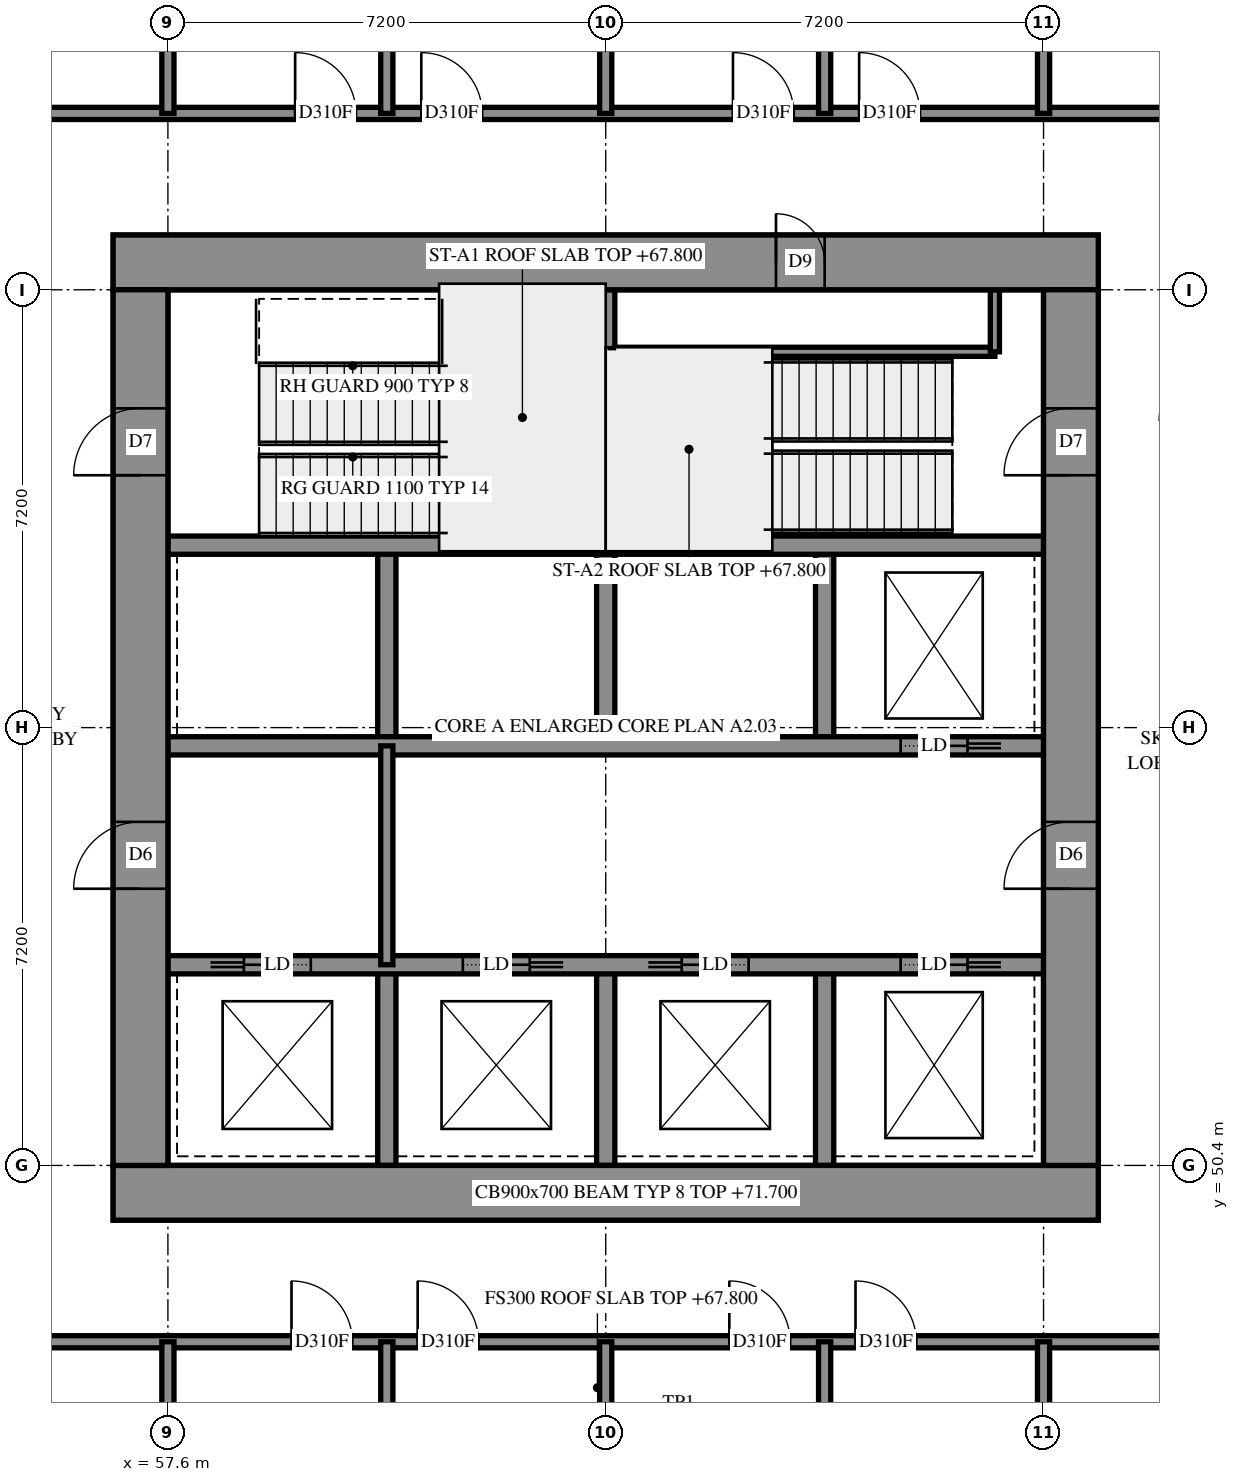
"""IFC4 building model, lengths in metres.
Left out: names, types, materials, properties, quantities, classifications, styles, units other than length and angle.
Written with IfcOpenShell. Run it as: python <this file> out.ifc"""

import sys

from ifc_helpers import new_model, si_unit, direction, frame, frame_2d, origin, place, context, subcontext, project, spatial, rectangle, extrude, element, fill, save


model = new_model("IFC4")
c1 = context("Model", 3, precision=1e-05, world=origin(), true_north=direction((0.0, 1.0)))
c2 = subcontext(c1, "Body", "Model", "MODEL_VIEW")
j1 = project(units=[si_unit("LENGTHUNIT", "METRE"), si_unit("PLANEANGLEUNIT", "RADIAN")], contexts=[c1])
p1 = place(None, origin())
s1 = spatial("IfcSite", under=j1, at=p1, CompositionType="ELEMENT")
p2 = place(p1, origin())
s2 = spatial("IfcBuilding", under=s1, at=p2, CompositionType="ELEMENT")
p3 = place(p2, frame((0.0, 0.0, 67.8)))
s3 = spatial("IfcBuildingStorey", under=s2, at=p3, CompositionType="ELEMENT", Elevation=67.8)
p4 = place(p3, frame((56.7, 49.95, -0.3), z_axis=(0.0, 0.0, 1.0), x_axis=(1.0, 0.0, 0.0)))
e1 = element("IfcWall", 1, at=p4, inside=s3, PredefinedType="SHEAR", context=c2, shape_type="SweptSolid", body=[
    extrude(rectangle(XDim=16.2, YDim=0.9, at=frame_2d((8.1, 0.0))), origin(), (0.0, 0.0, 1.0), 3.5),
])
p5 = place(p3, frame((56.7, 65.25, -0.3), z_axis=(0.0, 0.0, 1.0), x_axis=(1.0, 0.0, 0.0)))
e2 = element("IfcWall", 2, at=p5, inside=s3, PredefinedType="SHEAR", context=c2, shape_type="SweptSolid", body=[
    extrude(rectangle(XDim=16.2, YDim=0.9, at=frame_2d((8.1, 0.0))), origin(), (0.0, 0.0, 1.0), 3.5),
])
p6 = place(p5, frame((10.9, 0.0, 0.3)))
e3 = element("IfcOpeningElement", 3, at=p6, cuts=e2, PredefinedType="OPENING", context=c2, shape_type="SweptSolid", body=[
    extrude(rectangle(XDim=0.8, YDim=2.1, at=frame_2d((0.4, 1.05))), frame((0.0, 0.46, 0.0), z_axis=(0.0, -1.0, 0.0), x_axis=(1.0, 0.0, 0.0)), (0.0, 0.0, 1.0), 0.92),
])
p7 = place(p3, frame((57.15, 50.4, -0.3), z_axis=(0.0, 0.0, 1.0), x_axis=(0.0, 1.0, 0.0)))
e4 = element("IfcWall", 4, at=p7, inside=s3, PredefinedType="SHEAR", context=c2, shape_type="SweptSolid", body=[
    extrude(rectangle(XDim=14.4, YDim=0.9, at=frame_2d((7.2, 0.0))), origin(), (0.0, 0.0, 1.0), 3.5),
])
p8 = place(p7, frame((4.55, 0.0, 0.3)))
e5 = element("IfcOpeningElement", 5, at=p8, cuts=e4, PredefinedType="OPENING", context=c2, shape_type="SweptSolid", body=[
    extrude(rectangle(XDim=1.1, YDim=2.1, at=frame_2d((0.55, 1.05))), frame((0.0, 0.46, 0.0), z_axis=(0.0, -1.0, 0.0), x_axis=(1.0, 0.0, 0.0)), (0.0, 0.0, 1.0), 0.92),
])
p9 = place(p7, frame((11.35, 0.0, 0.3)))
e6 = element("IfcOpeningElement", 6, at=p9, cuts=e4, PredefinedType="OPENING", context=c2, shape_type="SweptSolid", body=[
    extrude(rectangle(XDim=1.1, YDim=2.1, at=frame_2d((0.55, 1.05))), frame((0.0, 0.46, 0.0), z_axis=(0.0, -1.0, 0.0), x_axis=(1.0, 0.0, 0.0)), (0.0, 0.0, 1.0), 0.92),
])
p10 = place(p3, frame((72.45, 50.4, -0.3), z_axis=(0.0, 0.0, 1.0), x_axis=(0.0, 1.0, 0.0)))
e7 = element("IfcWall", 7, at=p10, inside=s3, PredefinedType="SHEAR", context=c2, shape_type="SweptSolid", body=[
    extrude(rectangle(XDim=14.4, YDim=0.9, at=frame_2d((7.2, 0.0))), origin(), (0.0, 0.0, 1.0), 3.5),
])
p11 = place(p10, frame((4.55, 0.0, 0.3)))
e8 = element("IfcOpeningElement", 8, at=p11, cuts=e7, PredefinedType="OPENING", context=c2, shape_type="SweptSolid", body=[
    extrude(rectangle(XDim=1.1, YDim=2.1, at=frame_2d((0.55, 1.05))), frame((0.0, 0.46, 0.0), z_axis=(0.0, -1.0, 0.0), x_axis=(1.0, 0.0, 0.0)), (0.0, 0.0, 1.0), 0.92),
])
p12 = place(p10, frame((11.35, 0.0, 0.3)))
e9 = element("IfcOpeningElement", 9, at=p12, cuts=e7, PredefinedType="OPENING", context=c2, shape_type="SweptSolid", body=[
    extrude(rectangle(XDim=1.1, YDim=2.1, at=frame_2d((0.55, 1.05))), frame((0.0, 0.46, 0.0), z_axis=(0.0, -1.0, 0.0), x_axis=(1.0, 0.0, 0.0)), (0.0, 0.0, 1.0), 0.92),
])
for number, where, z_axis, x_axis in (
    (10, (61.2, 50.4, 0.0), (0.0, 0.0, 1.0), (0.0, 1.0, 0.0)),
    (11, (61.2, 57.3, 0.0), (0.0, 0.0, 1.0), (0.0, 1.0, 0.0)),
    (12, (64.8, 50.4, 0.0), (0.0, 0.0, 1.0), (0.0, 1.0, 0.0)),
    (13, (64.8, 57.3, 0.0), (0.0, 0.0, 1.0), (0.0, 1.0, 0.0)),
    (14, (68.4, 50.4, 0.0), (0.0, 0.0, 1.0), (0.0, 1.0, 0.0)),
    (15, (68.4, 57.3, 0.0), (0.0, 0.0, 1.0), (0.0, 1.0, 0.0)),
):
    element("IfcWall", number, at=place(p3, frame(where, z_axis=z_axis, x_axis=x_axis)), inside=s3, PredefinedType="SOLIDWALL", context=c2, shape_type="SweptSolid", body=[
        extrude(rectangle(XDim=3.3, YDim=0.3, at=frame_2d((1.65, 0.0))), origin(), (0.0, 0.0, 1.0), 3.9),
    ])
p13 = place(p3, frame((57.6, 53.7, 0.0), z_axis=(0.0, 0.0, 1.0), x_axis=(1.0, 0.0, 0.0)))
e16 = element("IfcWall", 16, at=p13, inside=s3, PredefinedType="SOLIDWALL", context=c2, shape_type="SweptSolid", body=[
    extrude(rectangle(XDim=14.4, YDim=0.3, at=frame_2d((7.2, 0.0))), origin(), (0.0, 0.0, 1.0), 3.9),
])
p14 = place(p13, frame((1.25, 0.0, 0.0)))
e17 = element("IfcOpeningElement", 17, at=p14, cuts=e16, PredefinedType="OPENING", context=c2, shape_type="SweptSolid", body=[
    extrude(rectangle(XDim=1.1, YDim=2.1, at=frame_2d((0.55, 1.05))), frame((0.0, 0.16, 0.0), z_axis=(0.0, -1.0, 0.0), x_axis=(1.0, 0.0, 0.0)), (0.0, 0.0, 1.0), 0.32),
])
p15 = place(p13, frame((4.85, 0.0, 0.0)))
e18 = element("IfcOpeningElement", 18, at=p15, cuts=e16, PredefinedType="OPENING", context=c2, shape_type="SweptSolid", body=[
    extrude(rectangle(XDim=1.1, YDim=2.1, at=frame_2d((0.55, 1.05))), frame((0.0, 0.16, 0.0), z_axis=(0.0, -1.0, 0.0), x_axis=(1.0, 0.0, 0.0)), (0.0, 0.0, 1.0), 0.32),
])
p16 = place(p13, frame((8.45, 0.0, 0.0)))
e19 = element("IfcOpeningElement", 19, at=p16, cuts=e16, PredefinedType="OPENING", context=c2, shape_type="SweptSolid", body=[
    extrude(rectangle(XDim=1.1, YDim=2.1, at=frame_2d((0.55, 1.05))), frame((0.0, 0.16, 0.0), z_axis=(0.0, -1.0, 0.0), x_axis=(1.0, 0.0, 0.0)), (0.0, 0.0, 1.0), 0.32),
])
p17 = place(p13, frame((12.05, 0.0, 0.0)))
e20 = element("IfcOpeningElement", 20, at=p17, cuts=e16, PredefinedType="OPENING", context=c2, shape_type="SweptSolid", body=[
    extrude(rectangle(XDim=1.1, YDim=2.1, at=frame_2d((0.55, 1.05))), frame((0.0, 0.16, 0.0), z_axis=(0.0, -1.0, 0.0), x_axis=(1.0, 0.0, 0.0)), (0.0, 0.0, 1.0), 0.32),
])
p18 = place(p3, frame((57.6, 57.3, 0.0), z_axis=(0.0, 0.0, 1.0), x_axis=(1.0, 0.0, 0.0)))
e21 = element("IfcWall", 21, at=p18, inside=s3, PredefinedType="SOLIDWALL", context=c2, shape_type="SweptSolid", body=[
    extrude(rectangle(XDim=14.4, YDim=0.3, at=frame_2d((7.2, 0.0))), origin(), (0.0, 0.0, 1.0), 3.9),
])
p19 = place(p18, frame((12.05, 0.0, 0.0)))
e22 = element("IfcOpeningElement", 22, at=p19, cuts=e21, PredefinedType="OPENING", context=c2, shape_type="SweptSolid", body=[
    extrude(rectangle(XDim=1.1, YDim=2.1, at=frame_2d((0.55, 1.05))), frame((0.0, 0.16, 0.0), z_axis=(0.0, -1.0, 0.0), x_axis=(1.0, 0.0, 0.0)), (0.0, 0.0, 1.0), 0.32),
])
for number, where, z_axis, x_axis in (
    (23, (57.6, 60.6, 0.0), (0.0, 0.0, 1.0), (1.0, 0.0, 0.0)),
    (24, (64.8, 60.6, 0.0), (0.0, 0.0, 1.0), (1.0, 0.0, 0.0)),
):
    element("IfcWall", number, at=place(p3, frame(where, z_axis=z_axis, x_axis=x_axis)), inside=s3, PredefinedType="SOLIDWALL", context=c2, shape_type="SweptSolid", body=[
        extrude(rectangle(XDim=7.2, YDim=0.3, at=frame_2d((3.6, 0.0))), origin(), (0.0, 0.0, 1.0), 3.9),
    ])
p20 = place(p3, frame((64.8, 60.6, 0.0), z_axis=(0.0, 0.0, 1.0), x_axis=(0.0, 1.0, 0.0)))
e25 = element("IfcWall", 25, at=p20, inside=s3, PredefinedType="SOLIDWALL", context=c2, shape_type="SweptSolid", body=[
    extrude(rectangle(XDim=4.2, YDim=0.3, at=frame_2d((2.1, 0.0))), origin(), (0.0, 0.0, 1.0), 3.9),
])
p21 = place(p3, frame((64.95, 63.78, 0.0), z_axis=(0.0, 0.0, 1.0), x_axis=(1.0, 0.0, 0.0)))
e26 = element("IfcWall", 26, at=p21, inside=s3, PredefinedType="PARTITIONING", context=c2, shape_type="SweptSolid", body=[
    extrude(rectangle(XDim=6.25, YDim=0.15, at=frame_2d((3.125, 0.0))), origin(), (0.0, 0.0, 1.0), 3.9),
])
p22 = place(p3, frame((71.2, 63.78, 0.0), z_axis=(0.0, 0.0, 1.0), x_axis=(0.0, 1.0, 0.0)))
e27 = element("IfcWall", 27, at=p22, inside=s3, PredefinedType="PARTITIONING", context=c2, shape_type="SweptSolid", body=[
    extrude(rectangle(XDim=1.02, YDim=0.15, at=frame_2d((0.51, 0.0))), origin(), (0.0, 0.0, 1.0), 3.9),
])
p23 = place(p3, frame((61.2, 53.7, 0.0), z_axis=(0.0, 0.0, 1.0), x_axis=(0.0, 1.0, 0.0)))
e28 = element("IfcWall", 28, at=p23, inside=s3, PredefinedType="PARTITIONING", context=c2, shape_type="SweptSolid", body=[
    extrude(rectangle(XDim=3.6, YDim=0.2, at=frame_2d((1.8, 0.0))), origin(), (0.0, 0.0, 1.0), 3.9),
])
p24 = place(p3, frame((54.7, 67.7, 0.0), z_axis=(0.0, 0.0, 1.0), x_axis=(1.0, 0.0, 0.0)))
e29 = element("IfcWall", 29, at=p24, inside=s3, PredefinedType="PARTITIONING", context=c2, shape_type="SweptSolid", body=[
    extrude(rectangle(XDim=20.2, YDim=0.2, at=frame_2d((10.1, 0.0))), origin(), (0.0, 0.0, 1.0), 3.9),
])
p25 = place(p24, frame((4.992, 0.0, 0.0)))
e30 = element("IfcOpeningElement", 30, at=p25, cuts=e29, PredefinedType="OPENING", context=c2, shape_type="SweptSolid", body=[
    extrude(rectangle(XDim=1.0, YDim=2.1, at=frame_2d((0.5, 1.05))), frame((0.0, 0.11, 0.0), z_axis=(0.0, -1.0, 0.0), x_axis=(1.0, 0.0, 0.0)), (0.0, 0.0, 1.0), 0.22),
])
p26 = place(p24, frame((7.067, 0.0, 0.0)))
e31 = element("IfcOpeningElement", 31, at=p26, cuts=e29, PredefinedType="OPENING", context=c2, shape_type="SweptSolid", body=[
    extrude(rectangle(XDim=1.0, YDim=2.1, at=frame_2d((0.5, 1.05))), frame((0.0, 0.11, 0.0), z_axis=(0.0, -1.0, 0.0), x_axis=(1.0, 0.0, 0.0)), (0.0, 0.0, 1.0), 0.22),
])
p27 = place(p24, frame((12.193, 0.0, 0.0)))
e32 = element("IfcOpeningElement", 32, at=p27, cuts=e29, PredefinedType="OPENING", context=c2, shape_type="SweptSolid", body=[
    extrude(rectangle(XDim=1.0, YDim=2.1, at=frame_2d((0.5, 1.05))), frame((0.0, 0.11, 0.0), z_axis=(0.0, -1.0, 0.0), x_axis=(1.0, 0.0, 0.0)), (0.0, 0.0, 1.0), 0.22),
])
p28 = place(p24, frame((14.268, 0.0, 0.0)))
e33 = element("IfcOpeningElement", 33, at=p28, cuts=e29, PredefinedType="OPENING", context=c2, shape_type="SweptSolid", body=[
    extrude(rectangle(XDim=1.0, YDim=2.1, at=frame_2d((0.5, 1.05))), frame((0.0, 0.11, 0.0), z_axis=(0.0, -1.0, 0.0), x_axis=(1.0, 0.0, 0.0)), (0.0, 0.0, 1.0), 0.22),
])
p29 = place(p3, frame((54.7, 47.5, 0.0), z_axis=(0.0, 0.0, 1.0), x_axis=(1.0, 0.0, 0.0)))
e34 = element("IfcWall", 34, at=p29, inside=s3, PredefinedType="PARTITIONING", context=c2, shape_type="SweptSolid", body=[
    extrude(rectangle(XDim=19.442, YDim=0.2, at=frame_2d((9.721, 0.0))), origin(), (0.0, 0.0, 1.0), 3.9),
])
p30 = place(p29, frame((4.933, 0.0, 0.0)))
e35 = element("IfcOpeningElement", 35, at=p30, cuts=e34, PredefinedType="OPENING", context=c2, shape_type="SweptSolid", body=[
    extrude(rectangle(XDim=1.0, YDim=2.1, at=frame_2d((0.5, 1.05))), frame((0.0, 0.11, 0.0), z_axis=(0.0, -1.0, 0.0), x_axis=(1.0, 0.0, 0.0)), (0.0, 0.0, 1.0), 0.22),
])
p31 = place(p29, frame((7.008, 0.0, 0.0)))
e36 = element("IfcOpeningElement", 36, at=p31, cuts=e34, PredefinedType="OPENING", context=c2, shape_type="SweptSolid", body=[
    extrude(rectangle(XDim=1.0, YDim=2.1, at=frame_2d((0.5, 1.05))), frame((0.0, 0.11, 0.0), z_axis=(0.0, -1.0, 0.0), x_axis=(1.0, 0.0, 0.0)), (0.0, 0.0, 1.0), 0.22),
])
p32 = place(p29, frame((12.133, 0.0, 0.0)))
e37 = element("IfcOpeningElement", 37, at=p32, cuts=e34, PredefinedType="OPENING", context=c2, shape_type="SweptSolid", body=[
    extrude(rectangle(XDim=1.0, YDim=2.1, at=frame_2d((0.5, 1.05))), frame((0.0, 0.11, 0.0), z_axis=(0.0, -1.0, 0.0), x_axis=(1.0, 0.0, 0.0)), (0.0, 0.0, 1.0), 0.22),
])
p33 = place(p29, frame((14.207, 0.0, 0.0)))
e38 = element("IfcOpeningElement", 38, at=p33, cuts=e34, PredefinedType="OPENING", context=c2, shape_type="SweptSolid", body=[
    extrude(rectangle(XDim=1.0, YDim=2.1, at=frame_2d((0.5, 1.05))), frame((0.0, 0.11, 0.0), z_axis=(0.0, -1.0, 0.0), x_axis=(1.0, 0.0, 0.0)), (0.0, 0.0, 1.0), 0.22),
])
for number, where, z_axis, x_axis in (
    (39, (57.6, 44.53, 0.0), (0.0, 0.0, 1.0), (0.0, 1.0, 0.0)),
    (40, (57.6, 67.7, 0.0), (0.0, 0.0, 1.0), (0.0, 1.0, 0.0)),
    (41, (61.2, 44.53, 0.0), (0.0, 0.0, 1.0), (0.0, 1.0, 0.0)),
    (42, (61.2, 67.7, 0.0), (0.0, 0.0, 1.0), (0.0, 1.0, 0.0)),
    (43, (64.8, 44.53, 0.0), (0.0, 0.0, 1.0), (0.0, 1.0, 0.0)),
    (44, (64.8, 67.7, 0.0), (0.0, 0.0, 1.0), (0.0, 1.0, 0.0)),
    (45, (68.4, 44.53, 0.0), (0.0, 0.0, 1.0), (0.0, 1.0, 0.0)),
    (46, (68.4, 67.7, 0.0), (0.0, 0.0, 1.0), (0.0, 1.0, 0.0)),
    (47, (72.0, 44.53, 0.0), (0.0, 0.0, 1.0), (0.0, 1.0, 0.0)),
    (48, (72.0, 67.7, 0.0), (0.0, 0.0, 1.0), (0.0, 1.0, 0.0)),
):
    element("IfcWall", number, at=place(p3, frame(where, z_axis=z_axis, x_axis=x_axis)), inside=s3, PredefinedType="PARTITIONING", context=c2, shape_type="SweptSolid", body=[
        extrude(rectangle(XDim=2.97, YDim=0.2, at=frame_2d((1.485, 0.0))), origin(), (0.0, 0.0, 1.0), 3.9),
    ])
p34 = place(p6, origin())
e49 = element("IfcDoor", 49, at=p34, inside=s3, OperationType="SINGLE_SWING_RIGHT", PredefinedType="DOOR", context=c2, shape_type="SweptSolid", body=[
    extrude(rectangle(XDim=0.8, YDim=2.1, at=frame_2d((0.4, 1.05))), frame((0.0, -0.39, 0.0), z_axis=(0.0, -1.0, 0.0), x_axis=(1.0, 0.0, 0.0)), (0.0, 0.0, 1.0), 0.05),
])
fill(e3, e49)
p35 = place(p8, origin())
e50 = element("IfcDoor", 50, at=p35, inside=s3, OperationType="DOUBLE_DOOR_SINGLE_SWING", PredefinedType="DOOR", context=c2, shape_type="SweptSolid", body=[
    extrude(rectangle(XDim=1.1, YDim=2.1, at=frame_2d((0.55, 1.05))), frame((0.0, 0.025, 0.0), z_axis=(0.0, -1.0, 0.0), x_axis=(1.0, 0.0, 0.0)), (0.0, 0.0, 1.0), 0.05),
])
fill(e5, e50)
p36 = place(p11, origin())
e51 = element("IfcDoor", 51, at=p36, inside=s3, OperationType="DOUBLE_DOOR_SINGLE_SWING", PredefinedType="DOOR", context=c2, shape_type="SweptSolid", body=[
    extrude(rectangle(XDim=1.1, YDim=2.1, at=frame_2d((0.55, 1.05))), frame((0.0, 0.025, 0.0), z_axis=(0.0, -1.0, 0.0), x_axis=(1.0, 0.0, 0.0)), (0.0, 0.0, 1.0), 0.05),
])
fill(e8, e51)
p37 = place(p9, origin())
e52 = element("IfcDoor", 52, at=p37, inside=s3, OperationType="SINGLE_SWING_LEFT", PredefinedType="DOOR", context=c2, shape_type="SweptSolid", body=[
    extrude(rectangle(XDim=1.1, YDim=2.1, at=frame_2d((0.55, 1.05))), frame((0.0, 0.025, 0.0), z_axis=(0.0, -1.0, 0.0), x_axis=(1.0, 0.0, 0.0)), (0.0, 0.0, 1.0), 0.05),
])
fill(e6, e52)
p38 = place(p12, origin())
e53 = element("IfcDoor", 53, at=p38, inside=s3, OperationType="SINGLE_SWING_RIGHT", PredefinedType="DOOR", context=c2, shape_type="SweptSolid", body=[
    extrude(rectangle(XDim=1.1, YDim=2.1, at=frame_2d((0.55, 1.05))), frame((0.0, 0.025, 0.0), z_axis=(0.0, -1.0, 0.0), x_axis=(1.0, 0.0, 0.0)), (0.0, 0.0, 1.0), 0.05),
])
fill(e9, e53)
p39 = place(p14, origin())
e54 = element("IfcDoor", 54, at=p39, inside=s3, OperationType="SLIDING_TO_LEFT", PredefinedType="DOOR", context=c2, shape_type="SweptSolid", body=[
    extrude(rectangle(XDim=1.1, YDim=2.1, at=frame_2d((0.55, 1.05))), frame((0.0, 0.025, 0.0), z_axis=(0.0, -1.0, 0.0), x_axis=(1.0, 0.0, 0.0)), (0.0, 0.0, 1.0), 0.05),
])
fill(e17, e54)
p40 = place(p15, origin())
e55 = element("IfcDoor", 55, at=p40, inside=s3, OperationType="SLIDING_TO_RIGHT", PredefinedType="DOOR", context=c2, shape_type="SweptSolid", body=[
    extrude(rectangle(XDim=1.1, YDim=2.1, at=frame_2d((0.55, 1.05))), frame((0.0, 0.025, 0.0), z_axis=(0.0, -1.0, 0.0), x_axis=(1.0, 0.0, 0.0)), (0.0, 0.0, 1.0), 0.05),
])
fill(e18, e55)
p41 = place(p16, origin())
e56 = element("IfcDoor", 56, at=p41, inside=s3, OperationType="SLIDING_TO_LEFT", PredefinedType="DOOR", context=c2, shape_type="SweptSolid", body=[
    extrude(rectangle(XDim=1.1, YDim=2.1, at=frame_2d((0.55, 1.05))), frame((0.0, 0.025, 0.0), z_axis=(0.0, -1.0, 0.0), x_axis=(1.0, 0.0, 0.0)), (0.0, 0.0, 1.0), 0.05),
])
fill(e19, e56)
p42 = place(p17, origin())
e57 = element("IfcDoor", 57, at=p42, inside=s3, OperationType="SLIDING_TO_RIGHT", PredefinedType="DOOR", context=c2, shape_type="SweptSolid", body=[
    extrude(rectangle(XDim=1.1, YDim=2.1, at=frame_2d((0.55, 1.05))), frame((0.0, 0.025, 0.0), z_axis=(0.0, -1.0, 0.0), x_axis=(1.0, 0.0, 0.0)), (0.0, 0.0, 1.0), 0.05),
])
fill(e20, e57)
p43 = place(p19, origin())
e58 = element("IfcDoor", 58, at=p43, inside=s3, OperationType="SLIDING_TO_RIGHT", PredefinedType="DOOR", context=c2, shape_type="SweptSolid", body=[
    extrude(rectangle(XDim=1.1, YDim=2.1, at=frame_2d((0.55, 1.05))), frame((0.0, 0.025, 0.0), z_axis=(0.0, -1.0, 0.0), x_axis=(1.0, 0.0, 0.0)), (0.0, 0.0, 1.0), 0.05),
])
fill(e22, e58)
p44 = place(p30, origin())
e59 = element("IfcDoor", 59, at=p44, inside=s3, OperationType="SINGLE_SWING_LEFT", PredefinedType="DOOR", context=c2, shape_type="SweptSolid", body=[
    extrude(rectangle(XDim=1.0, YDim=2.1, at=frame_2d((0.5, 1.05))), frame((0.0, 0.025, 0.0), z_axis=(0.0, -1.0, 0.0), x_axis=(1.0, 0.0, 0.0)), (0.0, 0.0, 1.0), 0.05),
])
fill(e35, e59)
p45 = place(p31, origin())
e60 = element("IfcDoor", 60, at=p45, inside=s3, OperationType="SINGLE_SWING_RIGHT", PredefinedType="DOOR", context=c2, shape_type="SweptSolid", body=[
    extrude(rectangle(XDim=1.0, YDim=2.1, at=frame_2d((0.5, 1.05))), frame((0.0, 0.025, 0.0), z_axis=(0.0, -1.0, 0.0), x_axis=(1.0, 0.0, 0.0)), (0.0, 0.0, 1.0), 0.05),
])
fill(e36, e60)
p46 = place(p32, origin())
e61 = element("IfcDoor", 61, at=p46, inside=s3, OperationType="SINGLE_SWING_LEFT", PredefinedType="DOOR", context=c2, shape_type="SweptSolid", body=[
    extrude(rectangle(XDim=1.0, YDim=2.1, at=frame_2d((0.5, 1.05))), frame((0.0, 0.025, 0.0), z_axis=(0.0, -1.0, 0.0), x_axis=(1.0, 0.0, 0.0)), (0.0, 0.0, 1.0), 0.05),
])
fill(e37, e61)
p47 = place(p33, origin())
e62 = element("IfcDoor", 62, at=p47, inside=s3, OperationType="SINGLE_SWING_RIGHT", PredefinedType="DOOR", context=c2, shape_type="SweptSolid", body=[
    extrude(rectangle(XDim=1.0, YDim=2.1, at=frame_2d((0.5, 1.05))), frame((0.0, 0.025, 0.0), z_axis=(0.0, -1.0, 0.0), x_axis=(1.0, 0.0, 0.0)), (0.0, 0.0, 1.0), 0.05),
])
fill(e38, e62)
p48 = place(p25, origin())
e63 = element("IfcDoor", 63, at=p48, inside=s3, OperationType="SINGLE_SWING_RIGHT", PredefinedType="DOOR", context=c2, shape_type="SweptSolid", body=[
    extrude(rectangle(XDim=1.0, YDim=2.1, at=frame_2d((0.5, 1.05))), frame((0.0, 0.025, 0.0), z_axis=(0.0, -1.0, 0.0), x_axis=(1.0, 0.0, 0.0)), (0.0, 0.0, 1.0), 0.05),
])
fill(e30, e63)
p49 = place(p26, origin())
e64 = element("IfcDoor", 64, at=p49, inside=s3, OperationType="SINGLE_SWING_LEFT", PredefinedType="DOOR", context=c2, shape_type="SweptSolid", body=[
    extrude(rectangle(XDim=1.0, YDim=2.1, at=frame_2d((0.5, 1.05))), frame((0.0, 0.025, 0.0), z_axis=(0.0, -1.0, 0.0), x_axis=(1.0, 0.0, 0.0)), (0.0, 0.0, 1.0), 0.05),
])
fill(e31, e64)
p50 = place(p27, origin())
e65 = element("IfcDoor", 65, at=p50, inside=s3, OperationType="SINGLE_SWING_RIGHT", PredefinedType="DOOR", context=c2, shape_type="SweptSolid", body=[
    extrude(rectangle(XDim=1.0, YDim=2.1, at=frame_2d((0.5, 1.05))), frame((0.0, 0.025, 0.0), z_axis=(0.0, -1.0, 0.0), x_axis=(1.0, 0.0, 0.0)), (0.0, 0.0, 1.0), 0.05),
])
fill(e32, e65)
p51 = place(p28, origin())
e66 = element("IfcDoor", 66, at=p51, inside=s3, OperationType="SINGLE_SWING_LEFT", PredefinedType="DOOR", context=c2, shape_type="SweptSolid", body=[
    extrude(rectangle(XDim=1.0, YDim=2.1, at=frame_2d((0.5, 1.05))), frame((0.0, 0.025, 0.0), z_axis=(0.0, -1.0, 0.0), x_axis=(1.0, 0.0, 0.0)), (0.0, 0.0, 1.0), 0.05),
])
fill(e33, e66)
save(model, sys.argv[1])
